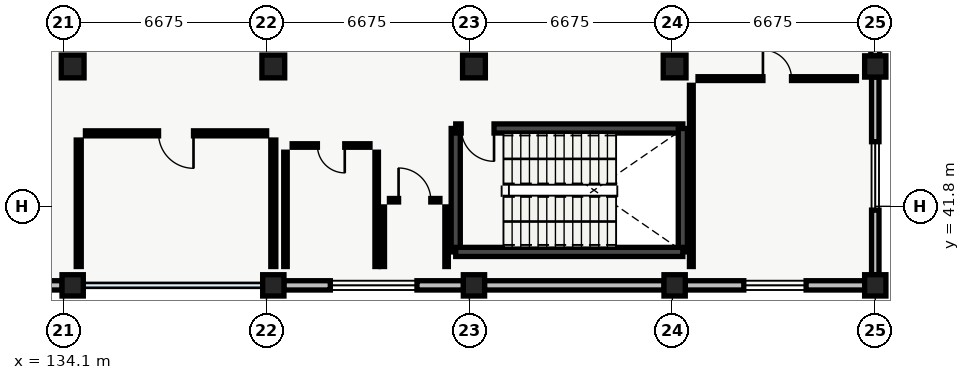
"""IFC4 building model, lengths in metres.
Left out: names, types, materials, properties, quantities, classifications, styles, units other than length and angle.
Written with IfcOpenShell. Run it as: python <this file> out.ifc"""

import sys

from ifc_helpers import new_model, si_unit, direction, frame, frame_2d, origin, origin_2d, place, context, subcontext, project, spatial, rectangle, extrude, element, fill, save


model = new_model("IFC4")
c1 = context("Model", 3, precision=1e-05, world=origin(), true_north=direction((0.0, 1.0)))
c2 = subcontext(c1, "Body", "Model", "MODEL_VIEW")
j1 = project(units=[si_unit("LENGTHUNIT", "METRE"), si_unit("PLANEANGLEUNIT", "RADIAN")], contexts=[c1])
p1 = place(None, origin())
s1 = spatial("IfcSite", under=j1, at=p1, CompositionType="ELEMENT")
p2 = place(p1, origin())
s2 = spatial("IfcBuilding", under=s1, at=p2, CompositionType="ELEMENT")
p3 = place(p2, frame((0.0, 0.0, 5.1)))
s3 = spatial("IfcBuildingStorey", under=s2, at=p3, CompositionType="ELEMENT", Elevation=5.1)
p4 = place(p3, frame((134.4, 39.2, 0.0), z_axis=(0.0, 0.0, 1.0), x_axis=(1.0, 0.0, 0.0)))
e1 = element("IfcColumn", 1, at=p4, inside=s3, PredefinedType="COLUMN", context=c2, shape_type="SweptSolid", body=[
    extrude(rectangle(XDim=0.7, YDim=0.7, at=origin_2d()), origin(), (0.0, 0.0, 1.0), 4.29),
])
p5 = place(p3, frame((134.4, 46.4, 0.0), z_axis=(0.0, 0.0, 1.0), x_axis=(1.0, 0.0, 0.0)))
e2 = element("IfcColumn", 2, at=p5, inside=s3, PredefinedType="COLUMN", context=c2, shape_type="SweptSolid", body=[
    extrude(rectangle(XDim=0.75, YDim=0.75, at=origin_2d()), origin(), (0.0, 0.0, 1.0), 4.29),
])
p6 = place(p3, frame((141.0, 39.2, 0.0), z_axis=(0.0, 0.0, 1.0), x_axis=(1.0, 0.0, 0.0)))
e3 = element("IfcColumn", 3, at=p6, inside=s3, PredefinedType="COLUMN", context=c2, shape_type="SweptSolid", body=[
    extrude(rectangle(XDim=0.7, YDim=0.7, at=origin_2d()), origin(), (0.0, 0.0, 1.0), 4.29),
])
p7 = place(p3, frame((141.0, 46.4, 0.0), z_axis=(0.0, 0.0, 1.0), x_axis=(1.0, 0.0, 0.0)))
e4 = element("IfcColumn", 4, at=p7, inside=s3, PredefinedType="COLUMN", context=c2, shape_type="SweptSolid", body=[
    extrude(rectangle(XDim=0.75, YDim=0.75, at=origin_2d()), origin(), (0.0, 0.0, 1.0), 4.29),
])
p8 = place(p3, frame((147.6, 39.2, 0.0), z_axis=(0.0, 0.0, 1.0), x_axis=(1.0, 0.0, 0.0)))
e5 = element("IfcColumn", 5, at=p8, inside=s3, PredefinedType="COLUMN", context=c2, shape_type="SweptSolid", body=[
    extrude(rectangle(XDim=0.7, YDim=0.7, at=origin_2d()), origin(), (0.0, 0.0, 1.0), 4.29),
])
p9 = place(p3, frame((147.6, 46.4, 0.0), z_axis=(0.0, 0.0, 1.0), x_axis=(1.0, 0.0, 0.0)))
e6 = element("IfcColumn", 6, at=p9, inside=s3, PredefinedType="COLUMN", context=c2, shape_type="SweptSolid", body=[
    extrude(rectangle(XDim=0.75, YDim=0.75, at=origin_2d()), origin(), (0.0, 0.0, 1.0), 4.29),
])
p10 = place(p3, frame((154.2, 39.2, 0.0), z_axis=(0.0, 0.0, 1.0), x_axis=(1.0, 0.0, 0.0)))
e7 = element("IfcColumn", 7, at=p10, inside=s3, PredefinedType="COLUMN", context=c2, shape_type="SweptSolid", body=[
    extrude(rectangle(XDim=0.7, YDim=0.7, at=origin_2d()), origin(), (0.0, 0.0, 1.0), 4.29),
])
p11 = place(p3, frame((154.2, 46.4, 0.0), z_axis=(0.0, 0.0, 1.0), x_axis=(1.0, 0.0, 0.0)))
e8 = element("IfcColumn", 8, at=p11, inside=s3, PredefinedType="COLUMN", context=c2, shape_type="SweptSolid", body=[
    extrude(rectangle(XDim=0.75, YDim=0.75, at=origin_2d()), origin(), (0.0, 0.0, 1.0), 4.29),
])
for number, where, z_axis, x_axis in (
    (9, (160.8, 39.2, 0.0), (0.0, 0.0, 1.0), (1.0, 0.0, 0.0)),
    (10, (160.8, 46.4, 0.0), (0.0, 0.0, 1.0), (1.0, 0.0, 0.0)),
):
    element("IfcColumn", number, at=place(p3, frame(where, z_axis=z_axis, x_axis=x_axis)), inside=s3, PredefinedType="COLUMN", context=c2, shape_type="SweptSolid", body=[
        extrude(rectangle(XDim=0.7, YDim=0.7, at=origin_2d()), origin(), (0.0, 0.0, 1.0), 4.29),
    ])
p12 = place(p3, frame((160.8, 53.255, 0.0), z_axis=(0.0, 0.0, 1.0), x_axis=(0.0, -1.0, 0.0)))
e11 = element("IfcWall", 11, at=p12, inside=s3, PredefinedType="STANDARD", context=c2, shape_type="SweptSolid", body=[
    extrude(rectangle(XDim=6.51, YDim=0.29, at=frame_2d((3.255, 0.0))), origin(), (0.0, 0.0, 1.0), 3.775),
])
p13 = place(p12, frame((1.98, 0.0, 0.95)))
e12 = element("IfcOpeningElement", 12, at=p13, cuts=e11, PredefinedType="OPENING", context=c2, shape_type="SweptSolid", body=[
    extrude(rectangle(XDim=2.55, YDim=1.75, at=frame_2d((1.275, 0.875))), frame((0.0, 0.145, 0.0), z_axis=(0.0, -1.0, 0.0), x_axis=(1.0, 0.0, 0.0)), (0.0, 0.0, 1.0), 0.29),
])
p14 = place(p3, frame((160.8, 46.055, 0.0), z_axis=(0.0, 0.0, 1.0), x_axis=(0.0, -1.0, 0.0)))
e13 = element("IfcWall", 13, at=p14, inside=s3, PredefinedType="STANDARD", context=c2, shape_type="SweptSolid", body=[
    extrude(rectangle(XDim=6.51, YDim=0.245, at=frame_2d((3.255, 0.0))), origin(), (0.0, 0.0, 1.0), 3.775),
])
p15 = place(p14, frame((2.13, 0.0, 0.95)))
e14 = element("IfcOpeningElement", 14, at=p15, cuts=e13, PredefinedType="OPENING", context=c2, shape_type="SweptSolid", body=[
    extrude(rectangle(XDim=2.25, YDim=1.55, at=frame_2d((1.125, 0.775))), frame((0.0, 0.123, 0.0), z_axis=(0.0, -1.0, 0.0), x_axis=(1.0, 0.0, 0.0)), (0.0, 0.0, 1.0), 0.245),
])
p16 = place(p3, frame((160.455, 39.2, 0.0), z_axis=(0.0, 0.0, 1.0), x_axis=(-1.0, 0.0, 0.0)))
e15 = element("IfcWall", 15, at=p16, inside=s3, PredefinedType="STANDARD", context=c2, shape_type="SweptSolid", body=[
    extrude(rectangle(XDim=5.91, YDim=0.305, at=frame_2d((2.955, 0.0))), origin(), (0.0, 0.0, 1.0), 3.775),
])
p17 = place(p16, frame((1.93, 0.0, 0.95)))
e16 = element("IfcOpeningElement", 16, at=p17, cuts=e15, PredefinedType="OPENING", context=c2, shape_type="SweptSolid", body=[
    extrude(rectangle(XDim=2.05, YDim=1.7, at=frame_2d((1.025, 0.85))), frame((0.0, 0.152, 0.0), z_axis=(0.0, -1.0, 0.0), x_axis=(1.0, 0.0, 0.0)), (0.0, 0.0, 1.0), 0.305),
])
p18 = place(p3, frame((153.855, 39.2, 0.0), z_axis=(0.0, 0.0, 1.0), x_axis=(-1.0, 0.0, 0.0)))
e17 = element("IfcWall", 17, at=p18, inside=s3, PredefinedType="STANDARD", context=c2, shape_type="SweptSolid", body=[
    extrude(rectangle(XDim=5.91, YDim=0.305, at=frame_2d((2.955, 0.0))), origin(), (0.0, 0.0, 1.0), 3.775),
])
p19 = place(p3, frame((147.255, 39.2, 0.0), z_axis=(0.0, 0.0, 1.0), x_axis=(-1.0, 0.0, 0.0)))
e18 = element("IfcWall", 18, at=p19, inside=s3, PredefinedType="STANDARD", context=c2, shape_type="SweptSolid", body=[
    extrude(rectangle(XDim=5.91, YDim=0.305, at=frame_2d((2.955, 0.0))), origin(), (0.0, 0.0, 1.0), 3.775),
])
p20 = place(p19, frame((1.53, 0.0, 0.95)))
e19 = element("IfcOpeningElement", 19, at=p20, cuts=e18, PredefinedType="OPENING", context=c2, shape_type="SweptSolid", body=[
    extrude(rectangle(XDim=2.85, YDim=1.5, at=frame_2d((1.425, 0.75))), frame((0.0, 0.152, 0.0), z_axis=(0.0, -1.0, 0.0), x_axis=(1.0, 0.0, 0.0)), (0.0, 0.0, 1.0), 0.305),
])
p21 = place(p3, frame((134.055, 39.2, 0.0), z_axis=(0.0, 0.0, 1.0), x_axis=(-1.0, 0.0, 0.0)))
e20 = element("IfcWall", 20, at=p21, inside=s3, PredefinedType="STANDARD", context=c2, shape_type="SweptSolid", body=[
    extrude(rectangle(XDim=5.91, YDim=0.305, at=frame_2d((2.955, 0.0))), origin(), (0.0, 0.0, 1.0), 3.775),
])
p22 = place(p21, frame((2.38, 0.0, 0.95)))
e21 = element("IfcOpeningElement", 21, at=p22, cuts=e20, PredefinedType="OPENING", context=c2, shape_type="SweptSolid", body=[
    extrude(rectangle(XDim=1.15, YDim=1.6, at=frame_2d((0.575, 0.8))), frame((0.0, 0.152, 0.0), z_axis=(0.0, -1.0, 0.0), x_axis=(1.0, 0.0, 0.0)), (0.0, 0.0, 1.0), 0.305),
])
p23 = place(p3, frame((147.0, 40.3, 0.0), z_axis=(0.0, 0.0, 1.0), x_axis=(0.0, 1.0, 0.0)))
e22 = element("IfcWall", 22, at=p23, inside=s3, PredefinedType="SHEAR", context=c2, shape_type="SweptSolid", body=[
    extrude(rectangle(XDim=4.06, YDim=0.3, at=frame_2d((2.03, 0.0))), origin(), (0.0, 0.0, 1.0), 4.28),
])
p24 = place(p3, frame((147.0, 44.36, 0.0), z_axis=(0.0, 0.0, 1.0), x_axis=(1.0, 0.0, 0.0)))
e23 = element("IfcWall", 23, at=p24, inside=s3, PredefinedType="SHEAR", context=c2, shape_type="SweptSolid", body=[
    extrude(rectangle(XDim=7.47, YDim=0.3, at=frame_2d((3.735, 0.0))), origin(), (0.0, 0.0, 1.0), 4.28),
])
p25 = place(p24, frame((0.18, 0.0, 0.0)))
e24 = element("IfcOpeningElement", 24, at=p25, cuts=e23, PredefinedType="OPENING", context=c2, shape_type="SweptSolid", body=[
    extrude(rectangle(XDim=1.08, YDim=2.15, at=frame_2d((0.54, 1.075))), frame((0.0, 0.15, 0.0), z_axis=(0.0, -1.0, 0.0), x_axis=(1.0, 0.0, 0.0)), (0.0, 0.0, 1.0), 0.3),
])
p26 = place(p3, frame((154.47, 44.36, 0.0), z_axis=(0.0, 0.0, 1.0), x_axis=(0.0, -1.0, 0.0)))
e25 = element("IfcWall", 25, at=p26, inside=s3, PredefinedType="SHEAR", context=c2, shape_type="SweptSolid", body=[
    extrude(rectangle(XDim=4.06, YDim=0.3, at=frame_2d((2.03, 0.0))), origin(), (0.0, 0.0, 1.0), 4.28),
])
p27 = place(p3, frame((154.47, 40.3, 0.0), z_axis=(0.0, 0.0, 1.0), x_axis=(-1.0, 0.0, 0.0)))
e26 = element("IfcWall", 26, at=p27, inside=s3, PredefinedType="SHEAR", context=c2, shape_type="SweptSolid", body=[
    extrude(rectangle(XDim=7.47, YDim=0.3, at=frame_2d((3.735, 0.0))), origin(), (0.0, 0.0, 1.0), 4.28),
])
p28 = place(p3, frame((144.4, 39.82, 0.0), z_axis=(0.0, 0.0, 1.0), x_axis=(0.0, 1.0, 0.0)))
e27 = element("IfcWall", 27, at=p28, inside=s3, PredefinedType="PARTITIONING", context=c2, shape_type="SweptSolid", body=[
    extrude(rectangle(XDim=3.76, YDim=0.115, at=frame_2d((1.88, 0.0))), origin(), (0.0, 0.0, 1.0), 3.95),
])
p29 = place(p3, frame((144.18, 43.8, 0.0), z_axis=(0.0, 0.0, 1.0), x_axis=(-1.0, 0.0, 0.0)))
e28 = element("IfcWall", 28, at=p29, inside=s3, PredefinedType="PARTITIONING", context=c2, shape_type="SweptSolid", body=[
    extrude(rectangle(XDim=2.56, YDim=0.115, at=frame_2d((1.28, 0.0))), origin(), (0.0, 0.0, 1.0), 3.95),
])
p30 = place(p29, frame((0.83, 0.0, 0.0)))
e29 = element("IfcOpeningElement", 29, at=p30, cuts=e28, PredefinedType="OPENING", context=c2, shape_type="SweptSolid", body=[
    extrude(rectangle(XDim=0.9, YDim=2.1, at=frame_2d((0.45, 1.05))), frame((0.0, 0.058, 0.0), z_axis=(0.0, -1.0, 0.0), x_axis=(1.0, 0.0, 0.0)), (0.0, 0.0, 1.0), 0.115),
])
p31 = place(p3, frame((141.4, 43.58, 0.0), z_axis=(0.0, 0.0, 1.0), x_axis=(0.0, -1.0, 0.0)))
e30 = element("IfcWall", 30, at=p31, inside=s3, PredefinedType="PARTITIONING", context=c2, shape_type="SweptSolid", body=[
    extrude(rectangle(XDim=3.76, YDim=0.115, at=frame_2d((1.88, 0.0))), origin(), (0.0, 0.0, 1.0), 3.95),
])
p32 = place(p3, frame((146.7, 39.82, 0.0), z_axis=(0.0, 0.0, 1.0), x_axis=(0.0, 1.0, 0.0)))
e31 = element("IfcWall", 31, at=p32, inside=s3, PredefinedType="PARTITIONING", context=c2, shape_type="SweptSolid", body=[
    extrude(rectangle(XDim=1.96, YDim=0.115, at=frame_2d((0.98, 0.0))), origin(), (0.0, 0.0, 1.0), 3.95),
])
p33 = place(p3, frame((146.48, 42.0, 0.0), z_axis=(0.0, 0.0, 1.0), x_axis=(-1.0, 0.0, 0.0)))
e32 = element("IfcWall", 32, at=p33, inside=s3, PredefinedType="PARTITIONING", context=c2, shape_type="SweptSolid", body=[
    extrude(rectangle(XDim=1.66, YDim=0.115, at=frame_2d((0.83, 0.0))), origin(), (0.0, 0.0, 1.0), 3.95),
])
p34 = place(p33, frame((0.3, 0.0, 0.0)))
e33 = element("IfcOpeningElement", 33, at=p34, cuts=e32, PredefinedType="OPENING", context=c2, shape_type="SweptSolid", body=[
    extrude(rectangle(XDim=1.06, YDim=2.12, at=frame_2d((0.53, 1.06))), frame((0.0, 0.058, 0.0), z_axis=(0.0, -1.0, 0.0), x_axis=(1.0, 0.0, 0.0)), (0.0, 0.0, 1.0), 0.115),
])
p35 = place(p3, frame((144.6, 41.78, 0.0), z_axis=(0.0, 0.0, 1.0), x_axis=(0.0, -1.0, 0.0)))
e34 = element("IfcWall", 34, at=p35, inside=s3, PredefinedType="PARTITIONING", context=c2, shape_type="SweptSolid", body=[
    extrude(rectangle(XDim=1.96, YDim=0.115, at=frame_2d((0.98, 0.0))), origin(), (0.0, 0.0, 1.0), 3.95),
])
p36 = place(p3, frame((141.0, 39.82, 0.0), z_axis=(0.0, 0.0, 1.0), x_axis=(0.0, 1.0, 0.0)))
e35 = element("IfcWall", 35, at=p36, inside=s3, PredefinedType="PARTITIONING", context=c2, shape_type="SweptSolid", body=[
    extrude(rectangle(XDim=4.16, YDim=0.165, at=frame_2d((2.08, 0.0))), origin(), (0.0, 0.0, 1.0), 3.625),
])
p37 = place(p3, frame((140.78, 44.2, 0.0), z_axis=(0.0, 0.0, 1.0), x_axis=(-1.0, 0.0, 0.0)))
e36 = element("IfcWall", 36, at=p37, inside=s3, PredefinedType="PARTITIONING", context=c2, shape_type="SweptSolid", body=[
    extrude(rectangle(XDim=5.96, YDim=0.165, at=frame_2d((2.98, 0.0))), origin(), (0.0, 0.0, 1.0), 3.95),
])
p38 = place(p37, frame((2.405, 0.0, 0.0)))
e37 = element("IfcOpeningElement", 37, at=p38, cuts=e36, PredefinedType="OPENING", context=c2, shape_type="SweptSolid", body=[
    extrude(rectangle(XDim=1.15, YDim=2.12, at=frame_2d((0.575, 1.06))), frame((0.0, 0.083, 0.0), z_axis=(0.0, -1.0, 0.0), x_axis=(1.0, 0.0, 0.0)), (0.0, 0.0, 1.0), 0.165),
])
p39 = place(p3, frame((134.6, 43.98, 0.0), z_axis=(0.0, 0.0, 1.0), x_axis=(0.0, -1.0, 0.0)))
e38 = element("IfcWall", 38, at=p39, inside=s3, PredefinedType="PARTITIONING", context=c2, shape_type="SweptSolid", body=[
    extrude(rectangle(XDim=4.16, YDim=0.165, at=frame_2d((2.08, 0.0))), origin(), (0.0, 0.0, 1.0), 3.625),
])
p40 = place(p3, frame((160.18, 46.0, 0.0), z_axis=(0.0, 0.0, 1.0), x_axis=(-1.0, 0.0, 0.0)))
e39 = element("IfcWall", 39, at=p40, inside=s3, PredefinedType="PARTITIONING", context=c2, shape_type="SweptSolid", body=[
    extrude(rectangle(XDim=5.21, YDim=0.125, at=frame_2d((2.605, 0.0))), origin(), (0.0, 0.0, 1.0), 3.95),
])
p41 = place(p40, frame((2.135, 0.0, 0.0)))
e40 = element("IfcOpeningElement", 40, at=p41, cuts=e39, PredefinedType="OPENING", context=c2, shape_type="SweptSolid", body=[
    extrude(rectangle(XDim=0.94, YDim=2.12, at=frame_2d((0.47, 1.06))), frame((0.0, 0.062, 0.0), z_axis=(0.0, -1.0, 0.0), x_axis=(1.0, 0.0, 0.0)), (0.0, 0.0, 1.0), 0.125),
])
p42 = place(p3, frame((154.75, 45.78, 0.0), z_axis=(0.0, 0.0, 1.0), x_axis=(0.0, -1.0, 0.0)))
e41 = element("IfcWall", 41, at=p42, inside=s3, PredefinedType="PARTITIONING", context=c2, shape_type="SweptSolid", body=[
    extrude(rectangle(XDim=5.96, YDim=0.125, at=frame_2d((2.98, 0.0))), origin(), (0.0, 0.0, 1.0), 3.95),
])
p43 = place(p15, origin())
e42 = element("IfcWindow", 42, at=p43, inside=s3, PartitioningType="SINGLE_PANEL", PredefinedType="WINDOW", context=c2, shape_type="SweptSolid", body=[
    extrude(rectangle(XDim=2.25, YDim=1.55, at=frame_2d((1.125, 0.775))), frame((0.0, 0.03, 0.0), z_axis=(0.0, -1.0, 0.0), x_axis=(1.0, 0.0, 0.0)), (0.0, 0.0, 1.0), 0.06),
])
fill(e14, e42)
p44 = place(p17, origin())
e43 = element("IfcWindow", 43, at=p44, inside=s3, PartitioningType="SINGLE_PANEL", PredefinedType="WINDOW", context=c2, shape_type="SweptSolid", body=[
    extrude(rectangle(XDim=2.05, YDim=1.7, at=frame_2d((1.025, 0.85))), frame((0.0, 0.03, 0.0), z_axis=(0.0, -1.0, 0.0), x_axis=(1.0, 0.0, 0.0)), (0.0, 0.0, 1.0), 0.06),
])
fill(e16, e43)
p45 = place(p20, origin())
e44 = element("IfcWindow", 44, at=p45, inside=s3, PartitioningType="SINGLE_PANEL", PredefinedType="WINDOW", context=c2, shape_type="SweptSolid", body=[
    extrude(rectangle(XDim=2.85, YDim=1.5, at=frame_2d((1.425, 0.75))), frame((0.0, 0.03, 0.0), z_axis=(0.0, -1.0, 0.0), x_axis=(1.0, 0.0, 0.0)), (0.0, 0.0, 1.0), 0.06),
])
fill(e19, e44)
p46 = place(p25, origin())
e45 = element("IfcDoor", 45, at=p46, inside=s3, OperationType="SINGLE_SWING_RIGHT", PredefinedType="DOOR", context=c2, shape_type="SweptSolid", body=[
    extrude(rectangle(XDim=1.08, YDim=2.15, at=frame_2d((0.54, 1.075))), frame((0.0, 0.025, 0.0), z_axis=(0.0, -1.0, 0.0), x_axis=(1.0, 0.0, 0.0)), (0.0, 0.0, 1.0), 0.05),
])
fill(e24, e45)
p47 = place(p30, origin())
e46 = element("IfcDoor", 46, at=p47, inside=s3, OperationType="SINGLE_SWING_LEFT", PredefinedType="DOOR", context=c2, shape_type="SweptSolid", body=[
    extrude(rectangle(XDim=0.9, YDim=2.1, at=frame_2d((0.45, 1.05))), frame((0.0, 0.025, 0.0), z_axis=(0.0, -1.0, 0.0), x_axis=(1.0, 0.0, 0.0)), (0.0, 0.0, 1.0), 0.05),
])
fill(e29, e46)
p48 = place(p34, origin())
e47 = element("IfcDoor", 47, at=p48, inside=s3, OperationType="SINGLE_SWING_RIGHT", PredefinedType="DOOR", context=c2, shape_type="SweptSolid", body=[
    extrude(rectangle(XDim=1.06, YDim=2.12, at=frame_2d((0.53, 1.06))), frame((0.0, 0.025, 0.0), z_axis=(0.0, -1.0, 0.0), x_axis=(1.0, 0.0, 0.0)), (0.0, 0.0, 1.0), 0.05),
])
fill(e33, e47)
p49 = place(p38, origin())
e48 = element("IfcDoor", 48, at=p49, inside=s3, OperationType="SINGLE_SWING_LEFT", PredefinedType="DOOR", context=c2, shape_type="SweptSolid", body=[
    extrude(rectangle(XDim=1.15, YDim=2.12, at=frame_2d((0.575, 1.06))), frame((0.0, 0.025, 0.0), z_axis=(0.0, -1.0, 0.0), x_axis=(1.0, 0.0, 0.0)), (0.0, 0.0, 1.0), 0.05),
])
fill(e37, e48)
p50 = place(p41, origin())
e49 = element("IfcDoor", 49, at=p50, inside=s3, OperationType="SINGLE_SWING_RIGHT", PredefinedType="DOOR", context=c2, shape_type="SweptSolid", body=[
    extrude(rectangle(XDim=0.94, YDim=2.12, at=frame_2d((0.47, 1.06))), frame((0.0, 0.025, 0.0), z_axis=(0.0, -1.0, 0.0), x_axis=(1.0, 0.0, 0.0)), (0.0, 0.0, 1.0), 0.05),
])
fill(e40, e49)
save(model, sys.argv[1])
